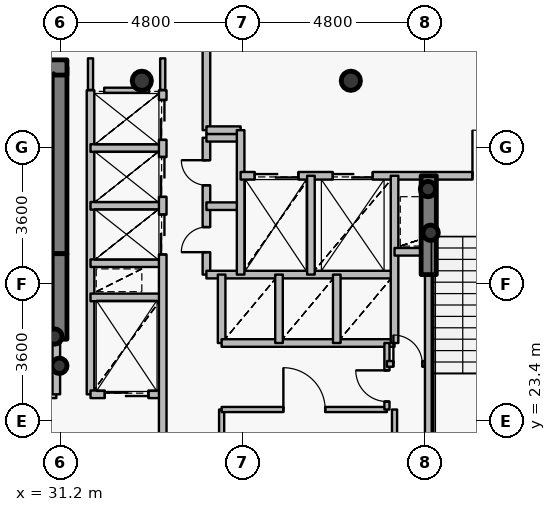
"""IFC4 building model, lengths in metres.
Left out: names, types, materials, properties, quantities, classifications, styles, units other than length and angle.
Written with IfcOpenShell. Run it as: python <this file> out.ifc"""

import sys

from ifc_helpers import new_model, si_unit, direction, frame, frame_2d, origin, origin_2d, place, context, subcontext, project, spatial, rectangle, hollow_circle, extrude, source, transform, mapped, element, fill, save


model = new_model("IFC4")
c1 = context("Model", 3, precision=1e-05, world=origin(), true_north=direction((0.0, 1.0)))
c2 = subcontext(c1, "Body", "Model", "MODEL_VIEW")
j1 = project(units=[si_unit("LENGTHUNIT", "METRE"), si_unit("PLANEANGLEUNIT", "RADIAN")], contexts=[c1])
p1 = place(None, origin())
s1 = spatial("IfcSite", under=j1, at=p1, CompositionType="ELEMENT")
p2 = place(p1, origin())
s2 = spatial("IfcBuilding", under=s1, at=p2, CompositionType="ELEMENT")
p3 = place(p2, frame((0.0, 0.0, 167.4)))
s3 = spatial("IfcBuildingStorey", under=s2, at=p3, CompositionType="ELEMENT", Elevation=167.4)
for number, where, z_axis, x_axis in (
    (1, (38.85, 32.35, 0.0), (0.0, 0.0, 1.0), (1.0, 0.0, 0.0)),
    (2, (33.35, 32.35, 0.0), (0.0, 0.0, 1.0), (1.0, 0.0, 0.0)),
):
    element("IfcColumn", number, at=place(p3, frame(where, z_axis=z_axis, x_axis=x_axis)), inside=s3, PredefinedType="COLUMN", context=c2, shape_type="SweptSolid", body=[
        extrude(hollow_circle(Radius=0.254, WallThickness=0.02, at=origin_2d()), origin(), (0.0, 0.0, 1.0), 3.75),
    ])
p4 = place(p3, frame((31.18, 27.8, 0.0), z_axis=(0.0, 0.0, 1.0), x_axis=(0.0, 1.0, 0.0)))
e3 = element("IfcWall", 3, at=p4, inside=s3, PredefinedType="SHEAR", context=c2, shape_type="SweptSolid", body=[
    extrude(rectangle(XDim=4.9, YDim=0.4, at=frame_2d((2.45, 0.0))), origin(), (0.0, 0.0, 1.0), 3.75),
])
p5 = place(p3, frame((27.28, 32.7, 0.0), z_axis=(0.0, 0.0, 1.0), x_axis=(1.0, 0.0, 0.0)))
e4 = element("IfcWall", 4, at=p5, inside=s3, PredefinedType="SHEAR", context=c2, shape_type="SweptSolid", body=[
    extrude(rectangle(XDim=4.1, YDim=0.4, at=frame_2d((2.05, 0.0))), origin(), (0.0, 0.0, 1.0), 3.75),
])
for number, where, z_axis, x_axis in (
    (5, (31.05, 25.62, 0.0), (0.0, 0.0, 1.0), (1.0, 0.0, 0.0)),
    (6, (31.18, 24.85, 0.0), (0.0, 0.0, 1.0), (1.0, 0.0, 0.0)),
    (7, (40.95, 28.35, 0.0), (0.0, 0.0, 1.0), (1.0, 0.0, 0.0)),
    (8, (40.88, 29.5, 0.0), (0.0, 0.0, 1.0), (1.0, 0.0, 0.0)),
):
    element("IfcColumn", number, at=place(p3, frame(where, z_axis=z_axis, x_axis=x_axis)), inside=s3, PredefinedType="COLUMN", context=c2, shape_type="SweptSolid", body=[
        extrude(hollow_circle(Radius=0.203, WallThickness=0.016, at=origin_2d()), origin(), (0.0, 0.0, 1.0), 3.75),
    ])
p6 = place(p3, frame((31.18, 25.55, 0.0), z_axis=(0.0, 0.0, 1.0), x_axis=(0.0, 1.0, 0.0)))
e9 = element("IfcWall", 9, at=p6, inside=s3, PredefinedType="SHEAR", context=c2, shape_type="SweptSolid", body=[
    extrude(rectangle(XDim=2.25, YDim=0.4, at=frame_2d((1.125, 0.0))), origin(), (0.0, 0.0, 1.0), 3.1),
])
p7 = place(p3, frame((40.9, 27.25, 0.0), z_axis=(0.0, 0.0, 1.0), x_axis=(0.0, 1.0, 0.0)))
e10 = element("IfcWall", 10, at=p7, inside=s3, PredefinedType="SHEAR", context=c2, shape_type="SweptSolid", body=[
    extrude(rectangle(XDim=2.6, YDim=0.4, at=frame_2d((1.3, 0.0))), origin(), (0.0, 0.0, 1.0), 3.1),
])
p8 = place(p3, frame((27.56, 24.1, 0.0), z_axis=(0.0, 0.0, 1.0), x_axis=(1.0, 0.0, 0.0)))
e11 = element("IfcWall", 11, at=p8, inside=s3, PredefinedType="PARTITIONING", context=c2, shape_type="SweptSolid", body=[
    extrude(rectangle(XDim=3.54, YDim=0.2, at=frame_2d((1.77, 0.0))), origin(), (0.0, 0.0, 1.0), 3.5),
])
p9 = place(p8, frame((1.17, 0.0, 0.0)))
e12 = element("IfcOpeningElement", 12, at=p9, cuts=e11, PredefinedType="OPENING", context=c2, shape_type="SweptSolid", body=[
    extrude(rectangle(XDim=1.2, YDim=2.15, at=origin_2d()), frame((0.6, 0.11, 1.075), z_axis=(0.0, -1.0, 0.0), x_axis=(1.0, 0.0, 0.0)), (0.0, 0.0, 1.0), 0.22),
])
p10 = place(p3, frame((31.1, 24.1, 0.0), z_axis=(0.0, 0.0, 1.0), x_axis=(0.0, 1.0, 0.0)))
e13 = element("IfcWall", 13, at=p10, inside=s3, PredefinedType="PARTITIONING", context=c2, shape_type="SweptSolid", body=[
    extrude(rectangle(XDim=1.44, YDim=0.2, at=frame_2d((0.72, 0.0))), origin(), (0.0, 0.0, 1.0), 3.5),
])
p11 = place(p3, frame((32.0, 24.1, 0.0), z_axis=(0.0, 0.0, 1.0), x_axis=(0.0, 1.0, 0.0)))
e14 = element("IfcWall", 14, at=p11, inside=s3, PredefinedType="PARTITIONING", context=c2, shape_type="SweptSolid", body=[
    extrude(rectangle(XDim=8.0, YDim=0.2, at=frame_2d((4.0, 0.0))), origin(), (0.0, 0.0, 1.0), 3.5),
])
p12 = place(p3, frame((32.0, 24.1, 0.0), z_axis=(0.0, 0.0, 1.0), x_axis=(1.0, 0.0, 0.0)))
e15 = element("IfcWall", 15, at=p12, inside=s3, PredefinedType="PARTITIONING", context=c2, shape_type="SweptSolid", body=[
    extrude(rectangle(XDim=1.9, YDim=0.2, at=frame_2d((0.95, 0.0))), origin(), (0.0, 0.0, 1.0), 3.085),
])
p13 = place(p12, frame((0.375, 0.0, 0.0)))
e16 = element("IfcOpeningElement", 16, at=p13, cuts=e15, PredefinedType="OPENING", context=c2, shape_type="SweptSolid", body=[
    extrude(rectangle(XDim=1.15, YDim=2.15, at=origin_2d()), frame((0.575, 0.11, 1.075), z_axis=(0.0, -1.0, 0.0), x_axis=(1.0, 0.0, 0.0)), (0.0, 0.0, 1.0), 0.22),
])
for number, where, z_axis, x_axis in (
    (17, (32.0, 26.65, 0.0), (0.0, 0.0, 1.0), (1.0, 0.0, 0.0)),
    (18, (32.0, 27.55, 0.0), (0.0, 0.0, 1.0), (1.0, 0.0, 0.0)),
    (19, (32.0, 29.06, 0.0), (0.0, 0.0, 1.0), (1.0, 0.0, 0.0)),
    (20, (32.0, 30.58, 0.0), (0.0, 0.0, 1.0), (1.0, 0.0, 0.0)),
):
    element("IfcWall", number, at=place(p3, frame(where, z_axis=z_axis, x_axis=x_axis)), inside=s3, PredefinedType="PARTITIONING", context=c2, shape_type="SweptSolid", body=[
        extrude(rectangle(XDim=1.9, YDim=0.2, at=frame_2d((0.95, 0.0))), origin(), (0.0, 0.0, 1.0), 3.085),
    ])
p14 = place(p3, frame((33.9, 20.8, 0.0), z_axis=(0.0, 0.0, 1.0), x_axis=(0.0, 1.0, 0.0)))
e21 = element("IfcWall", 21, at=p14, inside=s3, PredefinedType="PARTITIONING", context=c2, shape_type="SweptSolid", body=[
    extrude(rectangle(XDim=11.3, YDim=0.2, at=frame_2d((5.65, 0.0))), origin(), (0.0, 0.0, 1.0), 3.085),
])
p15 = place(p14, frame((6.98, 0.0, 0.0)))
e22 = element("IfcOpeningElement", 22, at=p15, cuts=e21, PredefinedType="OPENING", context=c2, shape_type="SweptSolid", body=[
    extrude(rectangle(XDim=1.05, YDim=2.15, at=origin_2d()), frame((0.525, 0.11, 1.075), z_axis=(0.0, -1.0, 0.0), x_axis=(1.0, 0.0, 0.0)), (0.0, 0.0, 1.0), 0.22),
])
p16 = place(p14, frame((8.495, 0.0, 0.0)))
e23 = element("IfcOpeningElement", 23, at=p16, cuts=e21, PredefinedType="OPENING", context=c2, shape_type="SweptSolid", body=[
    extrude(rectangle(XDim=1.05, YDim=2.15, at=origin_2d()), frame((0.525, 0.11, 1.075), z_axis=(0.0, -1.0, 0.0), x_axis=(1.0, 0.0, 0.0)), (0.0, 0.0, 1.0), 0.22),
])
p17 = place(p14, frame((9.995, 0.0, 0.0)))
e24 = element("IfcOpeningElement", 24, at=p17, cuts=e21, PredefinedType="OPENING", context=c2, shape_type="SweptSolid", body=[
    extrude(rectangle(XDim=1.05, YDim=2.15, at=origin_2d()), frame((0.525, 0.11, 1.075), z_axis=(0.0, -1.0, 0.0), x_axis=(1.0, 0.0, 0.0)), (0.0, 0.0, 1.0), 0.22),
])
p18 = place(p3, frame((35.05, 27.25, 0.0), z_axis=(0.0, 0.0, 1.0), x_axis=(0.0, 1.0, 0.0)))
e25 = element("IfcWall", 25, at=p18, inside=s3, PredefinedType="PARTITIONING", context=c2, shape_type="SweptSolid", body=[
    extrude(rectangle(XDim=3.6, YDim=0.2, at=frame_2d((1.8, 0.0))), origin(), (0.0, 0.0, 1.0), 3.5),
])
p19 = place(p18, frame((0.59, 0.0, 0.0)))
e26 = element("IfcOpeningElement", 26, at=p19, cuts=e25, PredefinedType="OPENING", context=c2, shape_type="SweptSolid", body=[
    extrude(rectangle(XDim=0.66, YDim=2.05, at=origin_2d()), frame((0.33, 0.11, 1.025), z_axis=(0.0, -1.0, 0.0), x_axis=(1.0, 0.0, 0.0)), (0.0, 0.0, 1.0), 0.22),
])
p20 = place(p18, frame((2.35, 0.0, 0.0)))
e27 = element("IfcOpeningElement", 27, at=p20, cuts=e25, PredefinedType="OPENING", context=c2, shape_type="SweptSolid", body=[
    extrude(rectangle(XDim=0.66, YDim=2.05, at=origin_2d()), frame((0.33, 0.11, 1.025), z_axis=(0.0, -1.0, 0.0), x_axis=(1.0, 0.0, 0.0)), (0.0, 0.0, 1.0), 0.22),
])
p21 = place(p3, frame((35.05, 27.25, 0.0), z_axis=(0.0, 0.0, 1.0), x_axis=(1.0, 0.0, 0.0)))
e28 = element("IfcWall", 28, at=p21, inside=s3, PredefinedType="PARTITIONING", context=c2, shape_type="SweptSolid", body=[
    extrude(rectangle(XDim=4.95, YDim=0.2, at=frame_2d((2.475, 0.0))), origin(), (0.0, 0.0, 1.0), 3.085),
])
for number, where, z_axis, x_axis in (
    (29, (35.05, 29.05, 0.0), (0.0, 0.0, 1.0), (1.0, 0.0, 0.0)),
    (30, (35.05, 30.85, 0.0), (0.0, 0.0, 1.0), (1.0, 0.0, 0.0)),
):
    element("IfcWall", number, at=place(p3, frame(where, z_axis=z_axis, x_axis=x_axis)), inside=s3, PredefinedType="PARTITIONING", context=c2, shape_type="SweptSolid", body=[
        extrude(rectangle(XDim=0.9, YDim=0.2, at=frame_2d((0.45, 0.0))), origin(), (0.0, 0.0, 1.0), 3.5),
    ])
p22 = place(p3, frame((35.05, 31.05, 0.0), z_axis=(0.0, 0.0, 1.0), x_axis=(0.0, 1.0, 0.0)))
e31 = element("IfcWall", 31, at=p22, inside=s3, PredefinedType="PARTITIONING", context=c2, shape_type="SweptSolid", body=[
    extrude(rectangle(XDim=2.15, YDim=0.2, at=frame_2d((1.075, 0.0))), origin(), (0.0, 0.0, 1.0), 3.085),
])
p23 = place(p3, frame((35.05, 31.05, 0.0), z_axis=(0.0, 0.0, 1.0), x_axis=(1.0, 0.0, 0.0)))
e32 = element("IfcWall", 32, at=p23, inside=s3, PredefinedType="PARTITIONING", context=c2, shape_type="SweptSolid", body=[
    extrude(rectangle(XDim=0.9, YDim=0.2, at=frame_2d((0.45, 0.0))), origin(), (0.0, 0.0, 1.0), 3.5),
])
p24 = place(p3, frame((35.45, 20.8, 0.0), z_axis=(0.0, 0.0, 1.0), x_axis=(0.0, 1.0, 0.0)))
e33 = element("IfcWall", 33, at=p24, inside=s3, PredefinedType="PARTITIONING", context=c2, shape_type="SweptSolid", body=[
    extrude(rectangle(XDim=2.9, YDim=0.135, at=frame_2d((1.45, 0.0))), origin(), (0.0, 0.0, 1.0), 3.085),
])
p25 = place(p3, frame((35.45, 23.7, 0.0), z_axis=(0.0, 0.0, 1.0), x_axis=(1.0, 0.0, 0.0)))
e34 = element("IfcWall", 34, at=p25, inside=s3, PredefinedType="PARTITIONING", context=c2, shape_type="SweptSolid", body=[
    extrude(rectangle(XDim=4.35, YDim=0.135, at=frame_2d((2.175, 0.0))), origin(), (0.0, 0.0, 1.0), 3.085),
])
p26 = place(p25, frame((1.625, 0.0, 0.0)))
e35 = element("IfcOpeningElement", 35, at=p26, cuts=e34, PredefinedType="OPENING", context=c2, shape_type="SweptSolid", body=[
    extrude(rectangle(XDim=1.1, YDim=2.15, at=origin_2d()), frame((0.55, 0.078, 1.075), z_axis=(0.0, -1.0, 0.0), x_axis=(1.0, 0.0, 0.0)), (0.0, 0.0, 1.0), 0.155),
])
p27 = place(p3, frame((35.45, 25.45, 0.0), z_axis=(0.0, 0.0, 1.0), x_axis=(0.0, 1.0, 0.0)))
e36 = element("IfcWall", 36, at=p27, inside=s3, PredefinedType="PARTITIONING", context=c2, shape_type="SweptSolid", body=[
    extrude(rectangle(XDim=1.8, YDim=0.2, at=frame_2d((0.9, 0.0))), origin(), (0.0, 0.0, 1.0), 3.5),
])
p28 = place(p3, frame((35.45, 25.45, 0.0), z_axis=(0.0, 0.0, 1.0), x_axis=(1.0, 0.0, 0.0)))
e37 = element("IfcWall", 37, at=p28, inside=s3, PredefinedType="PARTITIONING", context=c2, shape_type="SweptSolid", body=[
    extrude(rectangle(XDim=4.55, YDim=0.2, at=frame_2d((2.275, 0.0))), origin(), (0.0, 0.0, 1.0), 3.085),
])
p29 = place(p3, frame((35.95, 27.25, 0.0), z_axis=(0.0, 0.0, 1.0), x_axis=(0.0, 1.0, 0.0)))
e38 = element("IfcWall", 38, at=p29, inside=s3, PredefinedType="PARTITIONING", context=c2, shape_type="SweptSolid", body=[
    extrude(rectangle(XDim=3.8, YDim=0.2, at=frame_2d((1.9, 0.0))), origin(), (0.0, 0.0, 1.0), 3.5),
])
p30 = place(p3, frame((35.95, 29.85, 0.0), z_axis=(0.0, 0.0, 1.0), x_axis=(1.0, 0.0, 0.0)))
e39 = element("IfcWall", 39, at=p30, inside=s3, PredefinedType="PARTITIONING", context=c2, shape_type="SweptSolid", body=[
    extrude(rectangle(XDim=8.49, YDim=0.2, at=frame_2d((4.245, 0.0))), origin(), (0.0, 0.0, 1.0), 3.085),
])
p31 = place(p30, frame((6.1, 0.0, 0.0)))
e40 = element("IfcOpeningElement", 40, at=p31, cuts=e39, PredefinedType="OPENING", context=c2, shape_type="SweptSolid", body=[
    extrude(rectangle(XDim=1.2, YDim=2.15, at=origin_2d()), frame((0.6, 0.11, 1.075), z_axis=(0.0, -1.0, 0.0), x_axis=(1.0, 0.0, 0.0)), (0.0, 0.0, 1.0), 0.22),
])
p32 = place(p30, frame((0.37, 0.0, 0.0)))
e41 = element("IfcOpeningElement", 41, at=p32, cuts=e39, PredefinedType="OPENING", context=c2, shape_type="SweptSolid", body=[
    extrude(rectangle(XDim=1.15, YDim=2.15, at=origin_2d()), frame((0.575, 0.11, 1.075), z_axis=(0.0, -1.0, 0.0), x_axis=(1.0, 0.0, 0.0)), (0.0, 0.0, 1.0), 0.22),
])
p33 = place(p30, frame((2.425, 0.0, 0.0)))
e42 = element("IfcOpeningElement", 42, at=p33, cuts=e39, PredefinedType="OPENING", context=c2, shape_type="SweptSolid", body=[
    extrude(rectangle(XDim=1.05, YDim=2.15, at=origin_2d()), frame((0.525, 0.11, 1.075), z_axis=(0.0, -1.0, 0.0), x_axis=(1.0, 0.0, 0.0)), (0.0, 0.0, 1.0), 0.22),
])
p34 = place(p3, frame((36.96, 25.45, 0.0), z_axis=(0.0, 0.0, 1.0), x_axis=(0.0, 1.0, 0.0)))
e43 = element("IfcWall", 43, at=p34, inside=s3, PredefinedType="PARTITIONING", context=c2, shape_type="SweptSolid", body=[
    extrude(rectangle(XDim=1.8, YDim=0.2, at=frame_2d((0.9, 0.0))), origin(), (0.0, 0.0, 1.0), 3.5),
])
p35 = place(p3, frame((37.8, 27.25, 0.0), z_axis=(0.0, 0.0, 1.0), x_axis=(0.0, 1.0, 0.0)))
e44 = element("IfcWall", 44, at=p35, inside=s3, PredefinedType="PARTITIONING", context=c2, shape_type="SweptSolid", body=[
    extrude(rectangle(XDim=2.6, YDim=0.2, at=frame_2d((1.3, 0.0))), origin(), (0.0, 0.0, 1.0), 3.5),
])
p36 = place(p3, frame((38.48, 25.45, 0.0), z_axis=(0.0, 0.0, 1.0), x_axis=(0.0, 1.0, 0.0)))
e45 = element("IfcWall", 45, at=p36, inside=s3, PredefinedType="PARTITIONING", context=c2, shape_type="SweptSolid", body=[
    extrude(rectangle(XDim=1.8, YDim=0.2, at=frame_2d((0.9, 0.0))), origin(), (0.0, 0.0, 1.0), 3.5),
])
p37 = place(p3, frame((39.8, 23.7, 0.0), z_axis=(0.0, 0.0, 1.0), x_axis=(0.0, 1.0, 0.0)))
e46 = element("IfcWall", 46, at=p37, inside=s3, PredefinedType="PARTITIONING", context=c2, shape_type="SweptSolid", body=[
    extrude(rectangle(XDim=1.75, YDim=0.135, at=frame_2d((0.875, 0.0))), origin(), (0.0, 0.0, 1.0), 3.5),
])
p38 = place(p37, frame((0.21, 0.0, 0.0)))
e47 = element("IfcOpeningElement", 47, at=p38, cuts=e46, PredefinedType="OPENING", context=c2, shape_type="SweptSolid", body=[
    extrude(rectangle(XDim=0.82, YDim=2.1, at=origin_2d()), frame((0.41, 0.078, 1.05), z_axis=(0.0, -1.0, 0.0), x_axis=(1.0, 0.0, 0.0)), (0.0, 0.0, 1.0), 0.155),
])
p39 = place(p3, frame((39.8, 24.9, 0.0), z_axis=(0.0, 0.0, 1.0), x_axis=(1.0, 0.0, 0.0)))
e48 = element("IfcWall", 48, at=p39, inside=s3, PredefinedType="PARTITIONING", context=c2, shape_type="SweptSolid", body=[
    extrude(rectangle(XDim=1.1, YDim=0.15, at=frame_2d((0.55, 0.0))), origin(), (0.0, 0.0, 1.0), 3.5),
])
p40 = place(p39, frame((0.17, 0.0, 0.0)))
e49 = element("IfcOpeningElement", 49, at=p40, cuts=e48, PredefinedType="OPENING", context=c2, shape_type="SweptSolid", body=[
    extrude(rectangle(XDim=0.76, YDim=2.1, at=origin_2d()), frame((0.38, 0.085, 1.05), z_axis=(0.0, -1.0, 0.0), x_axis=(1.0, 0.0, 0.0)), (0.0, 0.0, 1.0), 0.17),
])
p41 = place(p3, frame((40.0, 25.45, 0.0), z_axis=(0.0, 0.0, 1.0), x_axis=(0.0, 1.0, 0.0)))
e50 = element("IfcWall", 50, at=p41, inside=s3, PredefinedType="PARTITIONING", context=c2, shape_type="SweptSolid", body=[
    extrude(rectangle(XDim=4.4, YDim=0.2, at=frame_2d((2.2, 0.0))), origin(), (0.0, 0.0, 1.0), 3.5),
])
p42 = place(p3, frame((40.0, 27.85, 0.0), z_axis=(0.0, 0.0, 1.0), x_axis=(1.0, 0.0, 0.0)))
e51 = element("IfcWall", 51, at=p42, inside=s3, PredefinedType="PARTITIONING", context=c2, shape_type="SweptSolid", body=[
    extrude(rectangle(XDim=0.9, YDim=0.2, at=frame_2d((0.45, 0.0))), origin(), (0.0, 0.0, 1.0), 3.5),
])
p43 = place(p3, frame((40.9, 21.33, 0.0), z_axis=(0.0, 0.0, 1.0), x_axis=(0.0, 1.0, 0.0)))
e52 = element("IfcWall", 52, at=p43, inside=s3, PredefinedType="PARTITIONING", context=c2, shape_type="SweptSolid", body=[
    extrude(rectangle(XDim=5.91, YDim=0.2, at=frame_2d((2.955, 0.0))), origin(), (0.0, 0.0, 1.0), 3.035),
])
p44 = place(p3, frame((32.36, 32.1, 0.0), z_axis=(0.0, 0.0, 1.0), x_axis=(1.0, 0.0, 0.0)))
e53 = element("IfcWall", 53, at=p44, inside=s3, PredefinedType="PARTITIONING", context=c2, shape_type="SweptSolid", body=[
    extrude(rectangle(XDim=1.18, YDim=0.135, at=frame_2d((0.59, 0.0))), origin(), (0.0, 0.0, 1.0), 3.085),
])
p45 = place(p3, frame((40.0, 23.7, 0.0), z_axis=(0.0, 0.0, 1.0), x_axis=(0.0, -1.0, 0.0)))
e54 = element("IfcWall", 54, at=p45, inside=s3, PredefinedType="PARTITIONING", context=c2, shape_type="SweptSolid", body=[
    extrude(rectangle(XDim=2.64, YDim=0.135, at=frame_2d((1.32, 0.0))), origin(), (0.0, 0.0, 1.0), 3.035),
])
p46 = place(p3, frame((32.0, 32.94, 0.0), z_axis=(0.0, 0.0, 1.0), x_axis=(0.0, -1.0, 0.0)))
e55 = element("IfcWall", 55, at=p46, inside=s3, PredefinedType="PARTITIONING", context=c2, shape_type="SweptSolid", body=[
    extrude(rectangle(XDim=0.83, YDim=0.135, at=frame_2d((0.415, 0.0))), origin(), (0.0, 0.0, 1.0), 3.035),
])
p47 = place(p3, frame((33.9, 32.11, 0.0), z_axis=(0.0, 0.0, 1.0), x_axis=(0.0, 1.0, 0.0)))
e56 = element("IfcWall", 56, at=p47, inside=s3, PredefinedType="PARTITIONING", context=c2, shape_type="SweptSolid", body=[
    extrude(rectangle(XDim=0.83, YDim=0.135, at=frame_2d((0.415, 0.0))), origin(), (0.0, 0.0, 1.0), 3.085),
])
m1 = source(origin(), c2, "Body", "SweptSolid", [
    extrude(rectangle(XDim=1.2, YDim=2.15, at=origin_2d()), frame((0.6, 0.025, 1.075), z_axis=(0.0, -1.0, 0.0), x_axis=(1.0, 0.0, 0.0)), (0.0, 0.0, 1.0), 0.05),
])
p48 = place(p31, origin())
e57 = element("IfcDoor", 57, at=p48, inside=s3, OperationType="SINGLE_SWING_LEFT", PredefinedType="DOOR", context=c2, shape_type="MappedRepresentation", body=[
    mapped(m1, transform((0.0, 0.0, 0.0), x_axis=(1.0, 0.0, 0.0), y_axis=(0.0, 1.0, 0.0), z_axis=(0.0, 0.0, 1.0), scale=1.0)),
])
fill(e40, e57)
m2 = source(origin(), c2, "Body", "SweptSolid", [
    extrude(rectangle(XDim=1.15, YDim=2.15, at=origin_2d()), frame((0.575, 0.025, 1.075), z_axis=(0.0, -1.0, 0.0), x_axis=(1.0, 0.0, 0.0)), (0.0, 0.0, 1.0), 0.05),
])
p49 = place(p32, origin())
e58 = element("IfcDoor", 58, at=p49, inside=s3, OperationType="DOUBLE_DOOR_SLIDING", PredefinedType="USERDEFINED", context=c2, shape_type="MappedRepresentation", body=[
    mapped(m2, transform((0.0, 0.0, 0.0), x_axis=(1.0, 0.0, 0.0), y_axis=(0.0, 1.0, 0.0), z_axis=(0.0, 0.0, 1.0), scale=1.0)),
])
fill(e41, e58)
p50 = place(p13, origin())
e59 = element("IfcDoor", 59, at=p50, inside=s3, OperationType="DOUBLE_DOOR_SLIDING", PredefinedType="USERDEFINED", context=c2, shape_type="MappedRepresentation", body=[
    mapped(m2, transform((0.0, 0.0, 0.0), x_axis=(1.0, 0.0, 0.0), y_axis=(0.0, 1.0, 0.0), z_axis=(0.0, 0.0, 1.0), scale=1.0)),
])
fill(e16, e59)
m3 = source(origin(), c2, "Body", "SweptSolid", [
    extrude(rectangle(XDim=1.05, YDim=2.15, at=origin_2d()), frame((0.525, 0.025, 1.075), z_axis=(0.0, -1.0, 0.0), x_axis=(1.0, 0.0, 0.0)), (0.0, 0.0, 1.0), 0.05),
])
p51 = place(p33, origin())
e60 = element("IfcDoor", 60, at=p51, inside=s3, OperationType="DOUBLE_DOOR_SLIDING", PredefinedType="USERDEFINED", context=c2, shape_type="MappedRepresentation", body=[
    mapped(m3, transform((0.0, 0.0, 0.0), x_axis=(1.0, 0.0, 0.0), y_axis=(0.0, 1.0, 0.0), z_axis=(0.0, 0.0, 1.0), scale=1.0)),
])
fill(e42, e60)
p52 = place(p15, origin())
e61 = element("IfcDoor", 61, at=p52, inside=s3, OperationType="DOUBLE_DOOR_SLIDING", PredefinedType="USERDEFINED", context=c2, shape_type="MappedRepresentation", body=[
    mapped(m3, transform((0.0, 0.0, 0.0), x_axis=(1.0, 0.0, 0.0), y_axis=(0.0, 1.0, 0.0), z_axis=(0.0, 0.0, 1.0), scale=1.0)),
])
fill(e22, e61)
p53 = place(p16, origin())
e62 = element("IfcDoor", 62, at=p53, inside=s3, OperationType="DOUBLE_DOOR_SLIDING", PredefinedType="USERDEFINED", context=c2, shape_type="MappedRepresentation", body=[
    mapped(m3, transform((0.0, 0.0, 0.0), x_axis=(1.0, 0.0, 0.0), y_axis=(0.0, 1.0, 0.0), z_axis=(0.0, 0.0, 1.0), scale=1.0)),
])
fill(e23, e62)
p54 = place(p17, origin())
e63 = element("IfcDoor", 63, at=p54, inside=s3, OperationType="DOUBLE_DOOR_SLIDING", PredefinedType="USERDEFINED", context=c2, shape_type="MappedRepresentation", body=[
    mapped(m3, transform((0.0, 0.0, 0.0), x_axis=(1.0, 0.0, 0.0), y_axis=(0.0, 1.0, 0.0), z_axis=(0.0, 0.0, 1.0), scale=1.0)),
])
fill(e24, e63)
m4 = source(origin(), c2, "Body", "SweptSolid", [
    extrude(rectangle(XDim=0.66, YDim=2.05, at=origin_2d()), frame((0.33, 0.025, 1.025), z_axis=(0.0, -1.0, 0.0), x_axis=(1.0, 0.0, 0.0)), (0.0, 0.0, 1.0), 0.05),
])
p55 = place(p19, origin())
e64 = element("IfcDoor", 64, at=p55, inside=s3, OperationType="SINGLE_SWING_LEFT", PredefinedType="USERDEFINED", context=c2, shape_type="MappedRepresentation", body=[
    mapped(m4, transform((0.0, 0.0, 0.0), x_axis=(1.0, 0.0, 0.0), y_axis=(0.0, 1.0, 0.0), z_axis=(0.0, 0.0, 1.0), scale=1.0)),
])
fill(e26, e64)
p56 = place(p20, origin())
e65 = element("IfcDoor", 65, at=p56, inside=s3, OperationType="SINGLE_SWING_RIGHT", PredefinedType="USERDEFINED", context=c2, shape_type="MappedRepresentation", body=[
    mapped(m4, transform((0.0, 0.0, 0.0), x_axis=(1.0, 0.0, 0.0), y_axis=(0.0, 1.0, 0.0), z_axis=(0.0, 0.0, 1.0), scale=1.0)),
])
fill(e27, e65)
m5 = source(origin(), c2, "Body", "SweptSolid", [
    extrude(rectangle(XDim=1.1, YDim=2.15, at=origin_2d()), frame((0.55, 0.025, 1.075), z_axis=(0.0, -1.0, 0.0), x_axis=(1.0, 0.0, 0.0)), (0.0, 0.0, 1.0), 0.05),
])
p57 = place(p26, origin())
e66 = element("IfcDoor", 66, at=p57, inside=s3, OperationType="SINGLE_SWING_LEFT", PredefinedType="DOOR", context=c2, shape_type="MappedRepresentation", body=[
    mapped(m5, transform((0.0, 0.0, 0.0), x_axis=(1.0, 0.0, 0.0), y_axis=(0.0, 1.0, 0.0), z_axis=(0.0, 0.0, 1.0), scale=1.0)),
])
fill(e35, e66)
m6 = source(origin(), c2, "Body", "SweptSolid", [
    extrude(rectangle(XDim=0.82, YDim=2.1, at=origin_2d()), frame((0.41, 0.025, 1.05), z_axis=(0.0, -1.0, 0.0), x_axis=(1.0, 0.0, 0.0)), (0.0, 0.0, 1.0), 0.05),
])
p58 = place(p38, origin())
e67 = element("IfcDoor", 67, at=p58, inside=s3, OperationType="SINGLE_SWING_RIGHT", PredefinedType="DOOR", context=c2, shape_type="MappedRepresentation", body=[
    mapped(m6, transform((0.0, 0.0, 0.0), x_axis=(1.0, 0.0, 0.0), y_axis=(0.0, 1.0, 0.0), z_axis=(0.0, 0.0, 1.0), scale=1.0)),
])
fill(e47, e67)
m7 = source(origin(), c2, "Body", "SweptSolid", [
    extrude(rectangle(XDim=0.76, YDim=2.1, at=origin_2d()), frame((0.38, 0.025, 1.05), z_axis=(0.0, -1.0, 0.0), x_axis=(1.0, 0.0, 0.0)), (0.0, 0.0, 1.0), 0.05),
])
p59 = place(p40, origin())
e68 = element("IfcDoor", 68, at=p59, inside=s3, OperationType="SINGLE_SWING_LEFT", PredefinedType="DOOR", context=c2, shape_type="MappedRepresentation", body=[
    mapped(m7, transform((0.0, 0.0, 0.0), x_axis=(1.0, 0.0, 0.0), y_axis=(0.0, 1.0, 0.0), z_axis=(0.0, 0.0, 1.0), scale=1.0)),
])
fill(e49, e68)
save(model, sys.argv[1])
